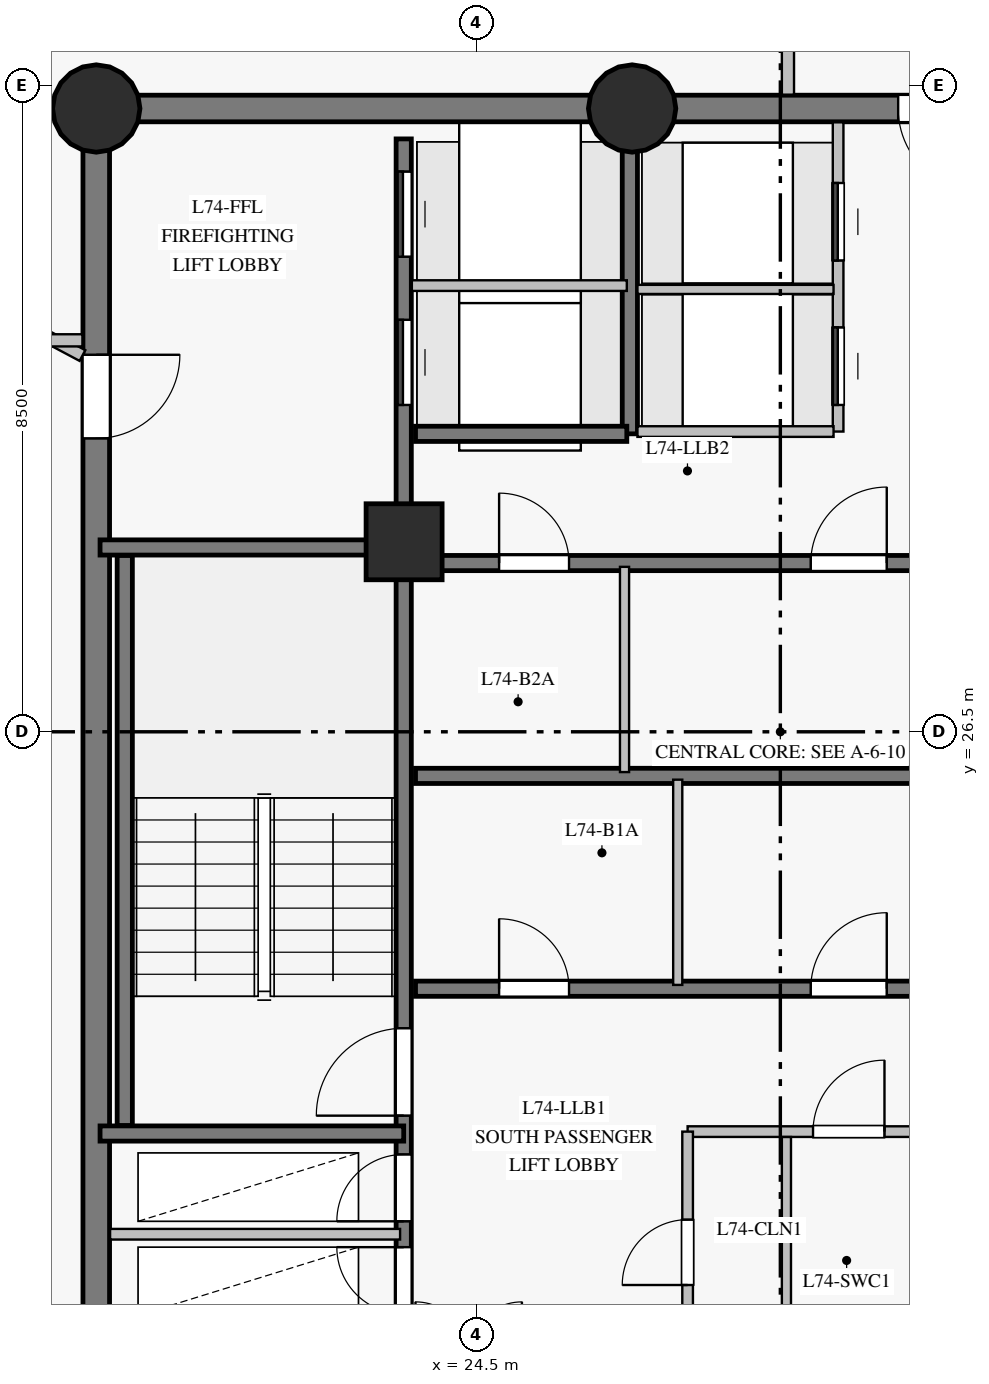
"""IFC4 building model, lengths in metres.
Left out: names, types, materials, properties, quantities, classifications, styles, units other than length and angle.
Written with IfcOpenShell. Run it as: python <this file> out.ifc"""

import sys

from ifc_helpers import new_model, si_unit, direction, frame, frame_2d, origin, origin_with_axes, origin_2d, place, context, subcontext, project, spatial, rectangle, circle, extrude, source, transform, mapped, element, fill, save


model = new_model("IFC4")
c1 = context("Model", 3, precision=1e-05, world=origin(), true_north=direction((0.0, 1.0)))
c2 = subcontext(c1, "Body", "Model", "MODEL_VIEW")
j1 = project(units=[si_unit("LENGTHUNIT", "METRE"), si_unit("PLANEANGLEUNIT", "RADIAN")], contexts=[c1])
p1 = place(None, origin())
s1 = spatial("IfcSite", under=j1, at=p1, CompositionType="ELEMENT")
p2 = place(p1, origin())
s2 = spatial("IfcBuilding", under=s1, at=p2, CompositionType="ELEMENT")
p3 = place(p2, frame((0.0, 0.0, 250.45)))
s3 = spatial("IfcBuildingStorey", under=s2, at=p3, CompositionType="ELEMENT", Elevation=250.45)
p4 = place(p3, frame((37.5, 34.7, 0.0), z_axis=(0.0, 0.0, 1.0), x_axis=(-1.0, 0.0, 0.0)))
e1 = element("IfcWall", 1, at=p4, inside=s3, PredefinedType="SHEAR", context=c2, shape_type="SweptSolid", body=[
    extrude(rectangle(XDim=10.95, YDim=0.35, at=frame_2d((5.475, 0.0))), origin(), (0.0, 0.0, 1.0), 2.85),
])
p5 = place(p4, frame((2.15, 0.0, 0.0)))
e2 = element("IfcOpeningElement", 2, at=p5, cuts=e1, PredefinedType="OPENING", context=c2, shape_type="SweptSolid", body=[
    extrude(rectangle(XDim=1.2, YDim=2.15, at=frame_2d((0.6, 1.075))), frame((0.0, 0.185, 0.0), z_axis=(0.0, -1.0, 0.0), x_axis=(1.0, 0.0, 0.0)), (0.0, 0.0, 1.0), 0.37),
])
p6 = place(p4, frame((6.35, 0.0, 0.0)))
e3 = element("IfcOpeningElement", 3, at=p6, cuts=e1, PredefinedType="OPENING", context=c2, shape_type="SweptSolid", body=[
    extrude(rectangle(XDim=1.1, YDim=2.15, at=frame_2d((0.55, 1.075))), frame((0.0, 0.185, 0.0), z_axis=(0.0, -1.0, 0.0), x_axis=(1.0, 0.0, 0.0)), (0.0, 0.0, 1.0), 0.37),
])
p7 = place(p3, frame((26.55, 34.7, 0.0), z_axis=(0.0, 0.0, 1.0), x_axis=(-1.0, 0.0, 0.0)))
e4 = element("IfcWall", 4, at=p7, inside=s3, PredefinedType="SHEAR", context=c2, shape_type="SweptSolid", body=[
    extrude(rectangle(XDim=7.05, YDim=0.35, at=frame_2d((3.525, 0.0))), origin(), (0.0, 0.0, 1.0), 2.85),
])
p8 = place(p3, frame((19.5, 34.7, 0.0), z_axis=(0.0, 0.0, 1.0), x_axis=(0.0, -1.0, 0.0)))
e5 = element("IfcWall", 5, at=p8, inside=s3, PredefinedType="SHEAR", context=c2, shape_type="SweptSolid", body=[
    extrude(rectangle(XDim=16.4, YDim=0.35, at=frame_2d((8.2, 0.0))), origin(), (0.0, 0.0, 1.0), 2.85),
])
p9 = place(p8, frame((3.24, 0.0, 0.0)))
e6 = element("IfcOpeningElement", 6, at=p9, cuts=e5, PredefinedType="OPENING", context=c2, shape_type="SweptSolid", body=[
    extrude(rectangle(XDim=1.1, YDim=2.15, at=frame_2d((0.55, 1.075))), frame((0.0, 0.185, 0.0), z_axis=(0.0, -1.0, 0.0), x_axis=(1.0, 0.0, 0.0)), (0.0, 0.0, 1.0), 0.37),
])
m1 = source(origin_with_axes(), c2, "Body", "SweptSolid", [
    extrude(circle(Radius=0.575, at=origin_2d()), origin(), (0.0, 0.0, 1.0), 3.05),
])
for number, where, z_axis, x_axis in (
    (7, (19.5, 34.7, 0.0), (0.0, 0.0, 1.0), (1.0, 0.0, 0.0)),
    (8, (26.55, 34.7, 0.0), (0.0, 0.0, 1.0), (1.0, 0.0, 0.0)),
):
    element("IfcColumn", number, at=place(p3, frame(where, z_axis=z_axis, x_axis=x_axis)), inside=s3, PredefinedType="COLUMN", context=c2, shape_type="MappedRepresentation", body=[
        mapped(m1, transform((0.0, 0.0, 0.0), scale=1.0)),
    ])
m2 = source(origin_with_axes(), c2, "Body", "SweptSolid", [
    extrude(rectangle(XDim=1.0, YDim=1.0, at=origin_2d()), origin(), (0.0, 0.0, 1.0), 3.05),
])
p10 = place(p3, frame((23.55, 29.0, 0.0), z_axis=(0.0, 0.0, 1.0), x_axis=(1.0, 0.0, 0.0)))
e9 = element("IfcColumn", 9, at=p10, inside=s3, PredefinedType="COLUMN", context=c2, shape_type="MappedRepresentation", body=[
    mapped(m2, transform((0.0, 0.0, 0.0), scale=1.0)),
])
p11 = place(p3, frame((23.545, 18.7, 0.0), z_axis=(0.0, 0.0, 1.0), x_axis=(0.0, 1.0, 0.0)))
e10 = element("IfcWall", 10, at=p11, inside=s3, PredefinedType="SHEAR", context=c2, shape_type="SweptSolid", body=[
    extrude(rectangle(XDim=15.6, YDim=0.2, at=frame_2d((7.8, 0.0))), origin(), (0.0, 0.0, 1.0), 2.85),
])
p12 = place(p11, frame((2.75, 0.0, 0.0)))
e11 = element("IfcOpeningElement", 11, at=p12, cuts=e10, PredefinedType="OPENING", context=c2, shape_type="SweptSolid", body=[
    extrude(rectangle(XDim=1.15, YDim=2.15, at=frame_2d((0.575, 1.075))), frame((0.0, 0.11, 0.0), z_axis=(0.0, -1.0, 0.0), x_axis=(1.0, 0.0, 0.0)), (0.0, 0.0, 1.0), 0.22),
])
p13 = place(p11, frame((0.14, 0.0, 0.0)))
e12 = element("IfcOpeningElement", 12, at=p13, cuts=e10, PredefinedType="OPENING", context=c2, shape_type="SweptSolid", body=[
    extrude(rectangle(XDim=0.88, YDim=2.1, at=frame_2d((0.44, 1.05))), frame((0.0, 0.11, 0.0), z_axis=(0.0, -1.0, 0.0), x_axis=(1.0, 0.0, 0.0)), (0.0, 0.0, 1.0), 0.22),
])
p14 = place(p11, frame((1.36, 0.0, 0.0)))
e13 = element("IfcOpeningElement", 13, at=p14, cuts=e10, PredefinedType="OPENING", context=c2, shape_type="SweptSolid", body=[
    extrude(rectangle(XDim=0.88, YDim=2.1, at=frame_2d((0.44, 1.05))), frame((0.0, 0.11, 0.0), z_axis=(0.0, -1.0, 0.0), x_axis=(1.0, 0.0, 0.0)), (0.0, 0.0, 1.0), 0.22),
])
p15 = place(p11, frame((12.1, 0.0, 0.0)))
e14 = element("IfcOpeningElement", 14, at=p15, cuts=e10, PredefinedType="OPENING", context=c2, shape_type="SweptSolid", body=[
    extrude(rectangle(XDim=1.12, YDim=2.15, at=frame_2d((0.56, 1.075))), frame((0.0, 0.11, 0.0), z_axis=(0.0, -1.0, 0.0), x_axis=(1.0, 0.0, 0.0)), (0.0, 0.0, 1.0), 0.22),
])
p16 = place(p11, frame((14.05, 0.0, 0.0)))
e15 = element("IfcOpeningElement", 15, at=p16, cuts=e10, PredefinedType="OPENING", context=c2, shape_type="SweptSolid", body=[
    extrude(rectangle(XDim=1.12, YDim=2.15, at=frame_2d((0.56, 1.075))), frame((0.0, 0.11, 0.0), z_axis=(0.0, -1.0, 0.0), x_axis=(1.0, 0.0, 0.0)), (0.0, 0.0, 1.0), 0.22),
])
p17 = place(p3, frame((23.7, 23.12, 0.0), z_axis=(0.0, 0.0, 1.0), x_axis=(1.0, 0.0, 0.0)))
e16 = element("IfcWall", 16, at=p17, inside=s3, PredefinedType="SHEAR", context=c2, shape_type="SweptSolid", body=[
    extrude(rectangle(XDim=9.6, YDim=0.2, at=frame_2d((4.8, 0.0))), origin(), (0.0, 0.0, 1.0), 2.85),
])
p18 = place(p17, frame((1.1, 0.0, 0.0)))
e17 = element("IfcOpeningElement", 17, at=p18, cuts=e16, PredefinedType="OPENING", context=c2, shape_type="SweptSolid", body=[
    extrude(rectangle(XDim=0.92, YDim=2.1, at=frame_2d((0.46, 1.05))), frame((0.0, 0.11, 0.0), z_axis=(0.0, -1.0, 0.0), x_axis=(1.0, 0.0, 0.0)), (0.0, 0.0, 1.0), 0.22),
])
p19 = place(p17, frame((5.2, 0.0, 0.0)))
e18 = element("IfcOpeningElement", 18, at=p19, cuts=e16, PredefinedType="OPENING", context=c2, shape_type="SweptSolid", body=[
    extrude(rectangle(XDim=1.0, YDim=2.15, at=frame_2d((0.5, 1.075))), frame((0.0, 0.11, 0.0), z_axis=(0.0, -1.0, 0.0), x_axis=(1.0, 0.0, 0.0)), (0.0, 0.0, 1.0), 0.22),
])
p20 = place(p3, frame((23.7, 25.92, 0.0), z_axis=(0.0, 0.0, 1.0), x_axis=(1.0, 0.0, 0.0)))
e19 = element("IfcWall", 19, at=p20, inside=s3, PredefinedType="SHEAR", context=c2, shape_type="SweptSolid", body=[
    extrude(rectangle(XDim=9.6, YDim=0.2, at=frame_2d((4.8, 0.0))), origin(), (0.0, 0.0, 1.0), 2.85),
])
p21 = place(p3, frame((23.7, 28.72, 0.0), z_axis=(0.0, 0.0, 1.0), x_axis=(1.0, 0.0, 0.0)))
e20 = element("IfcWall", 20, at=p21, inside=s3, PredefinedType="SHEAR", context=c2, shape_type="SweptSolid", body=[
    extrude(rectangle(XDim=9.6, YDim=0.2, at=frame_2d((4.8, 0.0))), origin(), (0.0, 0.0, 1.0), 2.85),
])
p22 = place(p21, frame((1.1, 0.0, 0.0)))
e21 = element("IfcOpeningElement", 21, at=p22, cuts=e20, PredefinedType="OPENING", context=c2, shape_type="SweptSolid", body=[
    extrude(rectangle(XDim=0.92, YDim=2.1, at=frame_2d((0.46, 1.05))), frame((0.0, 0.11, 0.0), z_axis=(0.0, -1.0, 0.0), x_axis=(1.0, 0.0, 0.0)), (0.0, 0.0, 1.0), 0.22),
])
p23 = place(p21, frame((5.2, 0.0, 0.0)))
e22 = element("IfcOpeningElement", 22, at=p23, cuts=e20, PredefinedType="OPENING", context=c2, shape_type="SweptSolid", body=[
    extrude(rectangle(XDim=1.0, YDim=2.15, at=frame_2d((0.5, 1.075))), frame((0.0, 0.11, 0.0), z_axis=(0.0, -1.0, 0.0), x_axis=(1.0, 0.0, 0.0)), (0.0, 0.0, 1.0), 0.22),
])
p24 = place(p3, frame((19.875, 21.32, 0.0), z_axis=(0.0, 0.0, 1.0), x_axis=(0.0, 1.0, 0.0)))
e23 = element("IfcWall", 23, at=p24, inside=s3, PredefinedType="SHEAR", context=c2, shape_type="SweptSolid", body=[
    extrude(rectangle(XDim=7.5, YDim=0.2, at=frame_2d((3.75, 0.0))), origin(), (0.0, 0.0, 1.0), 2.85),
])
for number, where, z_axis, x_axis in (
    (24, (19.55, 21.215, 0.0), (0.0, 0.0, 1.0), (1.0, 0.0, 0.0)),
    (25, (19.55, 28.925, 0.0), (0.0, 0.0, 1.0), (1.0, 0.0, 0.0)),
):
    element("IfcWall", number, at=place(p3, frame(where, z_axis=z_axis, x_axis=x_axis)), inside=s3, PredefinedType="SHEAR", context=c2, shape_type="SweptSolid", body=[
        extrude(rectangle(XDim=3.995, YDim=0.2, at=frame_2d((1.998, 0.0))), origin(), (0.0, 0.0, 1.0), 2.85),
    ])
p25 = place(p3, frame((26.52, 30.42, 0.0), z_axis=(0.0, 0.0, 1.0), x_axis=(0.0, 1.0, 0.0)))
e26 = element("IfcWall", 26, at=p25, inside=s3, PredefinedType="SHEAR", context=c2, shape_type="SweptSolid", body=[
    extrude(rectangle(XDim=3.86, YDim=0.2, at=frame_2d((1.93, 0.0))), origin(), (0.0, 0.0, 1.0), 2.85),
])
p26 = place(p3, frame((23.7, 30.42, 0.0), z_axis=(0.0, 0.0, 1.0), x_axis=(1.0, 0.0, 0.0)))
e27 = element("IfcWall", 27, at=p26, inside=s3, PredefinedType="SHEAR", context=c2, shape_type="SweptSolid", body=[
    extrude(rectangle(XDim=2.78, YDim=0.2, at=frame_2d((1.39, 0.0))), origin(), (0.0, 0.0, 1.0), 2.85),
])
p27 = place(p3, frame((19.319, 31.45, 0.0), z_axis=(0.0, 0.0, 1.0), x_axis=(-0.882939613172, 0.469486570087, 0.0)))
e28 = element("IfcWall", 28, at=p27, inside=s3, PredefinedType="PARTITIONING", context=c2, shape_type="SweptSolid", body=[
    extrude(rectangle(XDim=8.008, YDim=0.16, at=frame_2d((4.004, 0.0))), origin(), (0.0, 0.0, 1.0), 2.85),
])
p28 = place(p3, frame((29.26, 30.45, 0.0), z_axis=(0.0, 0.0, 1.0), x_axis=(0.0, 1.0, 0.0)))
e29 = element("IfcWall", 29, at=p28, inside=s3, PredefinedType="PARTITIONING", context=c2, shape_type="SweptSolid", body=[
    extrude(rectangle(XDim=4.068, YDim=0.14, at=frame_2d((2.034, 0.0))), origin(), (0.0, 0.0, 1.0), 2.85),
])
p29 = place(p28, frame((0.35, 0.0, 0.0)))
e30 = element("IfcOpeningElement", 30, at=p29, cuts=e29, PredefinedType="OPENING", context=c2, shape_type="SweptSolid", body=[
    extrude(rectangle(XDim=1.02, YDim=2.15, at=frame_2d((0.51, 1.075))), frame((0.0, 0.08, 0.0), z_axis=(0.0, -1.0, 0.0), x_axis=(1.0, 0.0, 0.0)), (0.0, 0.0, 1.0), 0.16),
])
p30 = place(p28, frame((2.25, 0.0, 0.0)))
e31 = element("IfcOpeningElement", 31, at=p30, cuts=e29, PredefinedType="OPENING", context=c2, shape_type="SweptSolid", body=[
    extrude(rectangle(XDim=1.02, YDim=2.15, at=frame_2d((0.51, 1.075))), frame((0.0, 0.08, 0.0), z_axis=(0.0, -1.0, 0.0), x_axis=(1.0, 0.0, 0.0)), (0.0, 0.0, 1.0), 0.16),
])
p31 = place(p3, frame((19.682, 19.89, 0.0), z_axis=(0.0, 0.0, 1.0), x_axis=(1.0, 0.0, 0.0)))
e32 = element("IfcWall", 32, at=p31, inside=s3, PredefinedType="PARTITIONING", context=c2, shape_type="SweptSolid", body=[
    extrude(rectangle(XDim=3.815, YDim=0.14, at=frame_2d((1.908, 0.0))), origin(), (0.0, 0.0, 1.0), 2.85),
])
p32 = place(p3, frame((27.28, 21.24, 0.0), z_axis=(0.0, 0.0, 1.0), x_axis=(1.0, 0.0, 0.0)))
e33 = element("IfcWall", 33, at=p32, inside=s3, PredefinedType="PARTITIONING", context=c2, shape_type="SweptSolid", body=[
    extrude(rectangle(XDim=3.44, YDim=0.14, at=frame_2d((1.72, 0.0))), origin(), (0.0, 0.0, 1.0), 2.85),
])
p33 = place(p32, frame((1.65, 0.0, 0.0)))
e34 = element("IfcOpeningElement", 34, at=p33, cuts=e33, PredefinedType="OPENING", context=c2, shape_type="SweptSolid", body=[
    extrude(rectangle(XDim=0.94, YDim=2.1, at=frame_2d((0.47, 1.05))), frame((0.0, 0.08, 0.0), z_axis=(0.0, -1.0, 0.0), x_axis=(1.0, 0.0, 0.0)), (0.0, 0.0, 1.0), 0.16),
])
p34 = place(p3, frame((23.652, 32.37, 0.0), z_axis=(0.0, 0.0, 1.0), x_axis=(1.0, 0.0, 0.0)))
e35 = element("IfcWall", 35, at=p34, inside=s3, PredefinedType="PARTITIONING", context=c2, shape_type="SweptSolid", body=[
    extrude(rectangle(XDim=2.828, YDim=0.14, at=frame_2d((1.414, 0.0))), origin(), (0.0, 0.0, 1.0), 2.85),
])
p35 = place(p3, frame((27.15, 23.17, 0.0), z_axis=(0.0, 0.0, 1.0), x_axis=(0.0, 1.0, 0.0)))
e36 = element("IfcWall", 36, at=p35, inside=s3, PredefinedType="PARTITIONING", context=c2, shape_type="SweptSolid", body=[
    extrude(rectangle(XDim=2.7, YDim=0.12, at=frame_2d((1.35, 0.0))), origin(), (0.0, 0.0, 1.0), 2.85),
])
p36 = place(p3, frame((26.45, 25.97, 0.0), z_axis=(0.0, 0.0, 1.0), x_axis=(0.0, 1.0, 0.0)))
e37 = element("IfcWall", 37, at=p36, inside=s3, PredefinedType="PARTITIONING", context=c2, shape_type="SweptSolid", body=[
    extrude(rectangle(XDim=2.7, YDim=0.12, at=frame_2d((1.35, 0.0))), origin(), (0.0, 0.0, 1.0), 2.85),
])
p37 = place(p3, frame((27.28, 18.482, 0.0), z_axis=(0.0, 0.0, 1.0), x_axis=(0.0, 1.0, 0.0)))
e38 = element("IfcWall", 38, at=p37, inside=s3, PredefinedType="PARTITIONING", context=c2, shape_type="SweptSolid", body=[
    extrude(rectangle(XDim=2.758, YDim=0.14, at=frame_2d((1.379, 0.0))), origin(), (0.0, 0.0, 1.0), 2.85),
])
p38 = place(p37, frame((0.74, 0.0, 0.0)))
e39 = element("IfcOpeningElement", 39, at=p38, cuts=e38, PredefinedType="OPENING", context=c2, shape_type="SweptSolid", body=[
    extrude(rectangle(XDim=0.86, YDim=2.1, at=frame_2d((0.43, 1.05))), frame((0.0, 0.08, 0.0), z_axis=(0.0, -1.0, 0.0), x_axis=(1.0, 0.0, 0.0)), (0.0, 0.0, 1.0), 0.16),
])
p39 = place(p3, frame((26.62, 30.45, 0.0), z_axis=(0.0, 0.0, 1.0), x_axis=(1.0, 0.0, 0.0)))
e40 = element("IfcWall", 40, at=p39, inside=s3, PredefinedType="PARTITIONING", context=c2, shape_type="SweptSolid", body=[
    extrude(rectangle(XDim=2.58, YDim=0.14, at=frame_2d((1.29, 0.0))), origin(), (0.0, 0.0, 1.0), 2.85),
])
p40 = place(p3, frame((26.62, 32.32, 0.0), z_axis=(0.0, 0.0, 1.0), x_axis=(1.0, 0.0, 0.0)))
e41 = element("IfcWall", 41, at=p40, inside=s3, PredefinedType="PARTITIONING", context=c2, shape_type="SweptSolid", body=[
    extrude(rectangle(XDim=2.58, YDim=0.12, at=frame_2d((1.29, 0.0))), origin(), (0.0, 0.0, 1.0), 2.85),
])
p41 = place(p3, frame((16.75, 31.65, 0.0), z_axis=(0.0, 0.0, 1.0), x_axis=(1.0, 0.0, 0.0)))
e42 = element("IfcWall", 42, at=p41, inside=s3, PredefinedType="PARTITIONING", context=c2, shape_type="SweptSolid", body=[
    extrude(rectangle(XDim=2.568, YDim=0.16, at=frame_2d((1.284, 0.0))), origin(), (0.0, 0.0, 1.0), 2.85),
])
p42 = place(p3, frame((28.58, 18.482, 0.0), z_axis=(0.0, 0.0, 1.0), x_axis=(0.0, 1.0, 0.0)))
e43 = element("IfcWall", 43, at=p42, inside=s3, PredefinedType="PARTITIONING", context=c2, shape_type="SweptSolid", body=[
    extrude(rectangle(XDim=2.687, YDim=0.12, at=frame_2d((1.344, 0.0))), origin(), (0.0, 0.0, 1.0), 2.85),
])
p43 = place(p3, frame((28.6, 34.882, 0.0), z_axis=(0.0, 0.0, 1.0), x_axis=(0.0, 1.0, 0.0)))
e44 = element("IfcWall", 44, at=p43, inside=s3, PredefinedType="PARTITIONING", context=c2, shape_type="SweptSolid", body=[
    extrude(rectangle(XDim=1.518, YDim=0.16, at=frame_2d((0.759, 0.0))), origin(), (0.0, 0.0, 1.0), 2.85),
])
m3 = source(origin_with_axes(), c2, "Body", "SweptSolid", [
    extrude(rectangle(XDim=1.15, YDim=2.15, at=frame_2d((0.575, 1.075))), frame((0.0, 0.025, 0.0), z_axis=(0.0, -1.0, 0.0), x_axis=(1.0, 0.0, 0.0)), (0.0, 0.0, 1.0), 0.05),
])
p44 = place(p12, origin())
e45 = element("IfcDoor", 45, at=p44, inside=s3, OperationType="SINGLE_SWING_LEFT", PredefinedType="DOOR", context=c2, shape_type="MappedRepresentation", body=[
    mapped(m3, transform((0.0, 0.0, 0.0), scale=1.0)),
])
fill(e11, e45)
m4 = source(origin_with_axes(), c2, "Body", "SweptSolid", [
    extrude(rectangle(XDim=1.1, YDim=2.15, at=frame_2d((0.55, 1.075))), frame((0.0, 0.025, 0.0), z_axis=(0.0, -1.0, 0.0), x_axis=(1.0, 0.0, 0.0)), (0.0, 0.0, 1.0), 0.05),
])
p45 = place(p9, origin())
e46 = element("IfcDoor", 46, at=p45, inside=s3, OperationType="SINGLE_SWING_LEFT", PredefinedType="DOOR", context=c2, shape_type="MappedRepresentation", body=[
    mapped(m4, transform((0.0, 0.0, 0.0), scale=1.0)),
])
fill(e6, e46)
m5 = source(origin_with_axes(), c2, "Body", "SweptSolid", [
    extrude(rectangle(XDim=0.88, YDim=2.1, at=frame_2d((0.44, 1.05))), frame((0.0, 0.025, 0.0), z_axis=(0.0, -1.0, 0.0), x_axis=(1.0, 0.0, 0.0)), (0.0, 0.0, 1.0), 0.05),
])
p46 = place(p13, origin())
e47 = element("IfcDoor", 47, at=p46, inside=s3, OperationType="SINGLE_SWING_RIGHT", PredefinedType="DOOR", context=c2, shape_type="MappedRepresentation", body=[
    mapped(m5, transform((0.0, 0.0, 0.0), scale=1.0)),
])
fill(e12, e47)
p47 = place(p14, origin())
e48 = element("IfcDoor", 48, at=p47, inside=s3, OperationType="SINGLE_SWING_LEFT", PredefinedType="DOOR", context=c2, shape_type="MappedRepresentation", body=[
    mapped(m5, transform((0.0, 0.0, 0.0), scale=1.0)),
])
fill(e13, e48)
m6 = source(origin_with_axes(), c2, "Body", "SweptSolid", [
    extrude(rectangle(XDim=0.86, YDim=2.1, at=frame_2d((0.43, 1.05))), frame((0.0, 0.025, 0.0), z_axis=(0.0, -1.0, 0.0), x_axis=(1.0, 0.0, 0.0)), (0.0, 0.0, 1.0), 0.05),
])
p48 = place(p38, origin())
e49 = element("IfcDoor", 49, at=p48, inside=s3, OperationType="SINGLE_SWING_LEFT", PredefinedType="DOOR", context=c2, shape_type="MappedRepresentation", body=[
    mapped(m6, transform((0.0, 0.0, 0.0), scale=1.0)),
])
fill(e39, e49)
m7 = source(origin_with_axes(), c2, "Body", "SweptSolid", [
    extrude(rectangle(XDim=0.94, YDim=2.1, at=frame_2d((0.47, 1.05))), frame((0.0, 0.025, 0.0), z_axis=(0.0, -1.0, 0.0), x_axis=(1.0, 0.0, 0.0)), (0.0, 0.0, 1.0), 0.05),
])
p49 = place(p33, origin())
e50 = element("IfcDoor", 50, at=p49, inside=s3, OperationType="SINGLE_SWING_RIGHT", PredefinedType="DOOR", context=c2, shape_type="MappedRepresentation", body=[
    mapped(m7, transform((0.0, 0.0, 0.0), scale=1.0)),
])
fill(e34, e50)
m8 = source(origin_with_axes(), c2, "Body", "SweptSolid", [
    extrude(rectangle(XDim=0.92, YDim=2.1, at=frame_2d((0.46, 1.05))), frame((0.0, 0.025, 0.0), z_axis=(0.0, -1.0, 0.0), x_axis=(1.0, 0.0, 0.0)), (0.0, 0.0, 1.0), 0.05),
])
p50 = place(p18, origin())
e51 = element("IfcDoor", 51, at=p50, inside=s3, OperationType="SINGLE_SWING_LEFT", PredefinedType="DOOR", context=c2, shape_type="MappedRepresentation", body=[
    mapped(m8, transform((0.0, 0.0, 0.0), scale=1.0)),
])
fill(e17, e51)
m9 = source(origin_with_axes(), c2, "Body", "SweptSolid", [
    extrude(rectangle(XDim=1.0, YDim=2.15, at=frame_2d((0.5, 1.075))), frame((0.0, 0.025, 0.0), z_axis=(0.0, -1.0, 0.0), x_axis=(1.0, 0.0, 0.0)), (0.0, 0.0, 1.0), 0.05),
])
p51 = place(p19, origin())
e52 = element("IfcDoor", 52, at=p51, inside=s3, OperationType="SINGLE_SWING_RIGHT", PredefinedType="DOOR", context=c2, shape_type="MappedRepresentation", body=[
    mapped(m9, transform((0.0, 0.0, 0.0), scale=1.0)),
])
fill(e18, e52)
p52 = place(p22, origin())
e53 = element("IfcDoor", 53, at=p52, inside=s3, OperationType="SINGLE_SWING_LEFT", PredefinedType="DOOR", context=c2, shape_type="MappedRepresentation", body=[
    mapped(m8, transform((0.0, 0.0, 0.0), scale=1.0)),
])
fill(e21, e53)
p53 = place(p23, origin())
e54 = element("IfcDoor", 54, at=p53, inside=s3, OperationType="SINGLE_SWING_RIGHT", PredefinedType="DOOR", context=c2, shape_type="MappedRepresentation", body=[
    mapped(m9, transform((0.0, 0.0, 0.0), scale=1.0)),
])
fill(e22, e54)
p54 = place(p6, origin())
e55 = element("IfcDoor", 55, at=p54, inside=s3, OperationType="SINGLE_SWING_LEFT", PredefinedType="DOOR", context=c2, shape_type="MappedRepresentation", body=[
    mapped(m4, transform((0.0, 0.0, 0.0), scale=1.0)),
])
fill(e3, e55)
m10 = source(origin_with_axes(), c2, "Body", "SweptSolid", [
    extrude(rectangle(XDim=1.12, YDim=2.15, at=frame_2d((0.56, 1.075))), frame((0.0, 0.025, 0.0), z_axis=(0.0, -1.0, 0.0), x_axis=(1.0, 0.0, 0.0)), (0.0, 0.0, 1.0), 0.05),
])
p55 = place(p15, origin())
e56 = element("IfcDoor", 56, at=p55, inside=s3, OperationType="SLIDING_TO_LEFT", PredefinedType="DOOR", context=c2, shape_type="MappedRepresentation", body=[
    mapped(m10, transform((0.0, 0.0, 0.0), scale=1.0)),
])
fill(e14, e56)
p56 = place(p16, origin())
e57 = element("IfcDoor", 57, at=p56, inside=s3, OperationType="SLIDING_TO_RIGHT", PredefinedType="DOOR", context=c2, shape_type="MappedRepresentation", body=[
    mapped(m10, transform((0.0, 0.0, 0.0), scale=1.0)),
])
fill(e15, e57)
m11 = source(origin_with_axes(), c2, "Body", "SweptSolid", [
    extrude(rectangle(XDim=1.02, YDim=2.15, at=frame_2d((0.51, 1.075))), frame((0.0, 0.025, 0.0), z_axis=(0.0, -1.0, 0.0), x_axis=(1.0, 0.0, 0.0)), (0.0, 0.0, 1.0), 0.05),
])
p57 = place(p29, origin())
e58 = element("IfcDoor", 58, at=p57, inside=s3, OperationType="SLIDING_TO_LEFT", PredefinedType="DOOR", context=c2, shape_type="MappedRepresentation", body=[
    mapped(m11, transform((0.0, 0.0, 0.0), scale=1.0)),
])
fill(e30, e58)
p58 = place(p30, origin())
e59 = element("IfcDoor", 59, at=p58, inside=s3, OperationType="SLIDING_TO_LEFT", PredefinedType="DOOR", context=c2, shape_type="MappedRepresentation", body=[
    mapped(m11, transform((0.0, 0.0, 0.0), scale=1.0)),
])
fill(e31, e59)
save(model, sys.argv[1])
